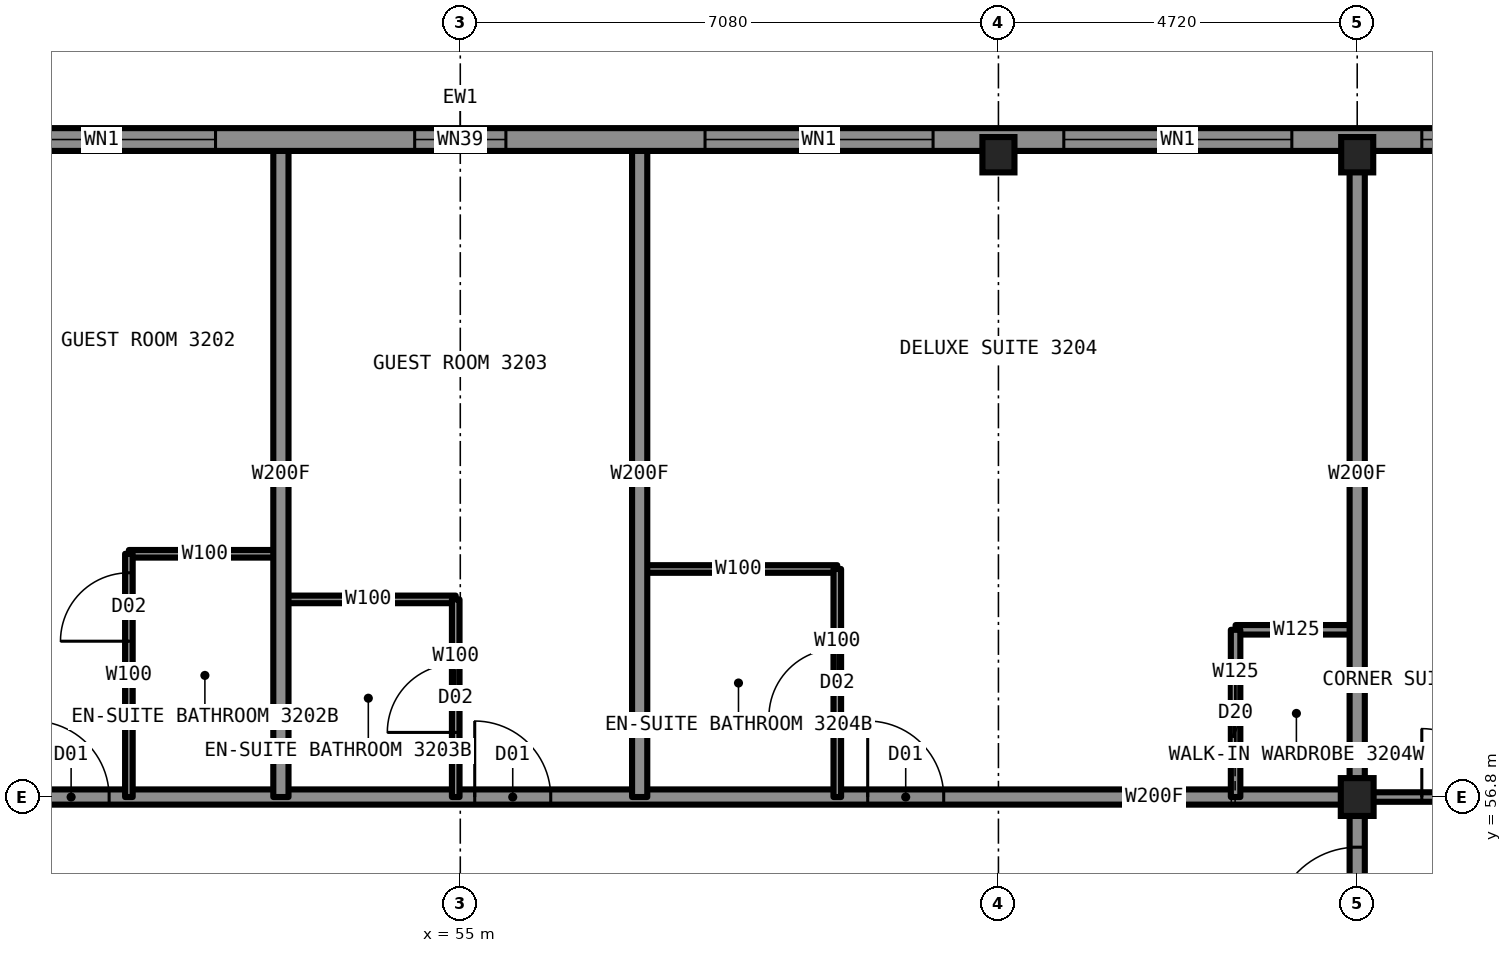
"""IFC4 building model, lengths in metres.
Left out: names, types, materials, properties, quantities, classifications, styles, units other than length and angle.
Written with IfcOpenShell. Run it as: python <this file> out.ifc"""

import sys

from ifc_helpers import new_model, si_unit, direction, frame, frame_2d, origin, origin_2d, place, context, subcontext, project, spatial, rectangle, i_section, extrude, element, fill, save


model = new_model("IFC4")
c1 = context("Model", 3, precision=1e-05, world=origin(), true_north=direction((0.0, 1.0)))
c2 = subcontext(c1, "Body", "Model", "MODEL_VIEW")
j1 = project(units=[si_unit("LENGTHUNIT", "METRE"), si_unit("PLANEANGLEUNIT", "RADIAN")], contexts=[c1])
p1 = place(None, origin())
s1 = spatial("IfcSite", under=j1, at=p1, CompositionType="ELEMENT")
p2 = place(p1, origin())
s2 = spatial("IfcBuilding", under=s1, at=p2, CompositionType="ELEMENT")
p3 = place(p2, frame((0.0, 0.0, 114.4)))
s3 = spatial("IfcBuildingStorey", under=s2, at=p3, CompositionType="ELEMENT", Elevation=114.4)
for number, where, z_axis, x_axis in (
    (1, (62.08, 65.25, 0.0), (0.0, 0.0, 1.0), (1.0, 0.0, 0.0)),
    (2, (66.8, 65.25, 0.0), (0.0, 0.0, 1.0), (1.0, 0.0, 0.0)),
):
    element("IfcColumn", number, at=place(p3, frame(where, z_axis=z_axis, x_axis=x_axis)), inside=s3, PredefinedType="COLUMN", context=c2, shape_type="SweptSolid", body=[
        extrude(i_section(OverallWidth=0.422, OverallDepth=0.465, WebThickness=0.045, FlangeThickness=0.073, at=origin_2d()), origin(), (0.0, 0.0, 1.0), 3.5),
    ])
p4 = place(p3, frame((66.8, 56.8, 0.0), z_axis=(0.0, 0.0, 1.0), x_axis=(1.0, 0.0, 0.0)))
e3 = element("IfcColumn", 3, at=p4, inside=s3, PredefinedType="COLUMN", context=c2, shape_type="SweptSolid", body=[
    extrude(i_section(OverallWidth=0.432, OverallDepth=0.498, WebThickness=0.056, FlangeThickness=0.089, at=origin_2d()), origin(), (0.0, 0.0, 1.0), 3.5),
])
p5 = place(p3, frame((43.2, 56.8, 0.0), z_axis=(0.0, 0.0, 1.0), x_axis=(1.0, 0.0, 0.0)))
e4 = element("IfcWall", 4, at=p5, inside=s3, PredefinedType="PARTITIONING", context=c2, shape_type="SweptSolid", body=[
    extrude(rectangle(XDim=23.6, YDim=0.2, at=frame_2d((11.8, 0.0))), origin(), (0.0, 0.0, 1.0), 3.33),
])
p6 = place(p5, frame((2.26, 0.0, 0.0)))
e5 = element("IfcOpeningElement", 5, at=p6, cuts=e4, PredefinedType="OPENING", context=c2, shape_type="SweptSolid", body=[
    extrude(rectangle(XDim=1.0, YDim=2.2, at=frame_2d((0.5, 1.1))), frame((0.0, 0.11, 0.0), z_axis=(0.0, -1.0, 0.0), x_axis=(1.0, 0.0, 0.0)), (0.0, 0.0, 1.0), 0.22),
])
p7 = place(p5, frame((6.18, 0.0, 0.0)))
e6 = element("IfcOpeningElement", 6, at=p7, cuts=e4, PredefinedType="OPENING", context=c2, shape_type="SweptSolid", body=[
    extrude(rectangle(XDim=1.0, YDim=2.2, at=frame_2d((0.5, 1.1))), frame((0.0, 0.11, 0.0), z_axis=(0.0, -1.0, 0.0), x_axis=(1.0, 0.0, 0.0)), (0.0, 0.0, 1.0), 0.22),
])
p8 = place(p5, frame((11.99, 0.0, 0.0)))
e7 = element("IfcOpeningElement", 7, at=p8, cuts=e4, PredefinedType="OPENING", context=c2, shape_type="SweptSolid", body=[
    extrude(rectangle(XDim=1.0, YDim=2.2, at=frame_2d((0.5, 1.1))), frame((0.0, 0.11, 0.0), z_axis=(0.0, -1.0, 0.0), x_axis=(1.0, 0.0, 0.0)), (0.0, 0.0, 1.0), 0.22),
])
p9 = place(p5, frame((17.16, 0.0, 0.0)))
e8 = element("IfcOpeningElement", 8, at=p9, cuts=e4, PredefinedType="OPENING", context=c2, shape_type="SweptSolid", body=[
    extrude(rectangle(XDim=1.0, YDim=2.2, at=frame_2d((0.5, 1.1))), frame((0.0, 0.11, 0.0), z_axis=(0.0, -1.0, 0.0), x_axis=(1.0, 0.0, 0.0)), (0.0, 0.0, 1.0), 0.22),
])
p10 = place(p3, frame((66.8, 56.8, 0.0), z_axis=(0.0, 0.0, 1.0), x_axis=(1.0, 0.0, 0.0)))
e9 = element("IfcWall", 9, at=p10, inside=s3, PredefinedType="PARTITIONING", context=c2, shape_type="SweptSolid", body=[
    extrude(rectangle(XDim=8.5, YDim=0.125, at=frame_2d((4.25, 0.0))), origin(), (0.0, 0.0, 1.0), 2.573),
])
p11 = place(p10, frame((0.85, 0.0, 0.0)))
e10 = element("IfcOpeningElement", 10, at=p11, cuts=e9, PredefinedType="OPENING", context=c2, shape_type="SweptSolid", body=[
    extrude(rectangle(XDim=0.9, YDim=2.2, at=frame_2d((0.45, 1.1))), frame((0.0, 0.073, 0.0), z_axis=(0.0, -1.0, 0.0), x_axis=(1.0, 0.0, 0.0)), (0.0, 0.0, 1.0), 0.145),
])
p12 = place(p3, frame((65.2, 59.0, 0.0), z_axis=(0.0, 0.0, 1.0), x_axis=(1.0, 0.0, 0.0)))
e11 = element("IfcWall", 11, at=p12, inside=s3, PredefinedType="PARTITIONING", context=c2, shape_type="SweptSolid", body=[
    extrude(rectangle(XDim=1.6, YDim=0.125, at=frame_2d((0.8, 0.0))), origin(), (0.0, 0.0, 1.0), 3.33),
])
p13 = place(p3, frame((52.64, 59.4, 0.0), z_axis=(0.0, 0.0, 1.0), x_axis=(1.0, 0.0, 0.0)))
e12 = element("IfcWall", 12, at=p13, inside=s3, PredefinedType="PARTITIONING", context=c2, shape_type="SweptSolid", body=[
    extrude(rectangle(XDim=2.3, YDim=0.1, at=frame_2d((1.15, 0.0))), origin(), (0.0, 0.0, 1.0), 3.33),
])
p14 = place(p3, frame((57.36, 59.8, 0.0), z_axis=(0.0, 0.0, 1.0), x_axis=(1.0, 0.0, 0.0)))
e13 = element("IfcWall", 13, at=p14, inside=s3, PredefinedType="PARTITIONING", context=c2, shape_type="SweptSolid", body=[
    extrude(rectangle(XDim=2.6, YDim=0.1, at=frame_2d((1.3, 0.0))), origin(), (0.0, 0.0, 1.0), 3.33),
])
p15 = place(p3, frame((50.64, 60.0, 0.0), z_axis=(0.0, 0.0, 1.0), x_axis=(1.0, 0.0, 0.0)))
e14 = element("IfcWall", 14, at=p15, inside=s3, PredefinedType="PARTITIONING", context=c2, shape_type="SweptSolid", body=[
    extrude(rectangle(XDim=2.0, YDim=0.1, at=frame_2d((1.0, 0.0))), origin(), (0.0, 0.0, 1.0), 2.731),
])
p16 = place(p3, frame((54.94, 56.8, 0.0), z_axis=(0.0, 0.0, 1.0), x_axis=(0.0, 1.0, 0.0)))
e15 = element("IfcWall", 15, at=p16, inside=s3, PredefinedType="PARTITIONING", context=c2, shape_type="SweptSolid", body=[
    extrude(rectangle(XDim=2.6, YDim=0.1, at=frame_2d((1.3, 0.0))), origin(), (0.0, 0.0, 1.0), 2.573),
])
p17 = place(p16, frame((0.85, 0.0, 0.0)))
e16 = element("IfcOpeningElement", 16, at=p17, cuts=e15, PredefinedType="OPENING", context=c2, shape_type="SweptSolid", body=[
    extrude(rectangle(XDim=0.9, YDim=2.1, at=frame_2d((0.45, 1.05))), frame((0.0, 0.06, 0.0), z_axis=(0.0, -1.0, 0.0), x_axis=(1.0, 0.0, 0.0)), (0.0, 0.0, 1.0), 0.12),
])
p18 = place(p3, frame((52.64, 56.8, 0.0), z_axis=(0.0, 0.0, 1.0), x_axis=(0.0, 1.0, 0.0)))
e17 = element("IfcWall", 17, at=p18, inside=s3, PredefinedType="PARTITIONING", context=c2, shape_type="SweptSolid", body=[
    extrude(rectangle(XDim=8.5, YDim=0.2, at=frame_2d((4.25, 0.0))), origin(), (0.0, 0.0, 1.0), 3.33),
])
p19 = place(p3, frame((50.64, 56.8, 0.0), z_axis=(0.0, 0.0, 1.0), x_axis=(0.0, 1.0, 0.0)))
e18 = element("IfcWall", 18, at=p19, inside=s3, PredefinedType="PARTITIONING", context=c2, shape_type="SweptSolid", body=[
    extrude(rectangle(XDim=3.2, YDim=0.1, at=frame_2d((1.6, 0.0))), origin(), (0.0, 0.0, 1.0), 3.33),
])
p20 = place(p19, frame((2.05, 0.0, 0.0)))
e19 = element("IfcOpeningElement", 19, at=p20, cuts=e18, PredefinedType="OPENING", context=c2, shape_type="SweptSolid", body=[
    extrude(rectangle(XDim=0.9, YDim=2.1, at=frame_2d((0.45, 1.05))), frame((0.0, 0.06, 0.0), z_axis=(0.0, -1.0, 0.0), x_axis=(1.0, 0.0, 0.0)), (0.0, 0.0, 1.0), 0.12),
])
p21 = place(p3, frame((65.2, 56.8, 0.0), z_axis=(0.0, 0.0, 1.0), x_axis=(0.0, 1.0, 0.0)))
e20 = element("IfcWall", 20, at=p21, inside=s3, PredefinedType="PARTITIONING", context=c2, shape_type="SweptSolid", body=[
    extrude(rectangle(XDim=2.2, YDim=0.125, at=frame_2d((1.1, 0.0))), origin(), (0.0, 0.0, 1.0), 3.33),
])
p22 = place(p21, frame((0.7, 0.0, 0.0)))
e21 = element("IfcOpeningElement", 21, at=p22, cuts=e20, PredefinedType="OPENING", context=c2, shape_type="SweptSolid", body=[
    extrude(rectangle(XDim=0.8, YDim=2.1, at=frame_2d((0.4, 1.05))), frame((0.0, 0.073, 0.0), z_axis=(0.0, -1.0, 0.0), x_axis=(1.0, 0.0, 0.0)), (0.0, 0.0, 1.0), 0.145),
])
p23 = place(p3, frame((66.8, 52.08, 0.0), z_axis=(0.0, 0.0, 1.0), x_axis=(0.0, 1.0, 0.0)))
e22 = element("IfcWall", 22, at=p23, inside=s3, PredefinedType="PARTITIONING", context=c2, shape_type="SweptSolid", body=[
    extrude(rectangle(XDim=4.72, YDim=0.2, at=frame_2d((2.36, 0.0))), origin(), (0.0, 0.0, 1.0), 3.33),
])
p24 = place(p23, frame((2.96, 0.0, 0.0)))
e23 = element("IfcOpeningElement", 23, at=p24, cuts=e22, PredefinedType="OPENING", context=c2, shape_type="SweptSolid", body=[
    extrude(rectangle(XDim=1.1, YDim=2.2, at=frame_2d((0.55, 1.1))), frame((0.0, 0.11, 0.0), z_axis=(0.0, -1.0, 0.0), x_axis=(1.0, 0.0, 0.0)), (0.0, 0.0, 1.0), 0.22),
])
p25 = place(p3, frame((66.8, 56.8, 0.0), z_axis=(0.0, 0.0, 1.0), x_axis=(0.0, 1.0, 0.0)))
e24 = element("IfcWall", 24, at=p25, inside=s3, PredefinedType="PARTITIONING", context=c2, shape_type="SweptSolid", body=[
    extrude(rectangle(XDim=8.5, YDim=0.2, at=frame_2d((4.25, 0.0))), origin(), (0.0, 0.0, 1.0), 2.573),
])
p26 = place(p3, frame((57.36, 56.8, 0.0), z_axis=(0.0, 0.0, 1.0), x_axis=(0.0, 1.0, 0.0)))
e25 = element("IfcWall", 25, at=p26, inside=s3, PredefinedType="PARTITIONING", context=c2, shape_type="SweptSolid", body=[
    extrude(rectangle(XDim=8.5, YDim=0.2, at=frame_2d((4.25, 0.0))), origin(), (0.0, 0.0, 1.0), 3.33),
])
p27 = place(p3, frame((59.96, 56.8, 0.0), z_axis=(0.0, 0.0, 1.0), x_axis=(0.0, 1.0, 0.0)))
e26 = element("IfcWall", 26, at=p27, inside=s3, PredefinedType="PARTITIONING", context=c2, shape_type="SweptSolid", body=[
    extrude(rectangle(XDim=3.0, YDim=0.1, at=frame_2d((1.5, 0.0))), origin(), (0.0, 0.0, 1.0), 3.33),
])
p28 = place(p27, frame((1.05, 0.0, 0.0)))
e27 = element("IfcOpeningElement", 27, at=p28, cuts=e26, PredefinedType="OPENING", context=c2, shape_type="SweptSolid", body=[
    extrude(rectangle(XDim=0.9, YDim=2.1, at=frame_2d((0.45, 1.05))), frame((0.0, 0.06, 0.0), z_axis=(0.0, -1.0, 0.0), x_axis=(1.0, 0.0, 0.0)), (0.0, 0.0, 1.0), 0.12),
])
p29 = place(p3, frame((70.1, 65.45, 0.0), z_axis=(0.0, 0.0, 1.0), x_axis=(-1.0, 0.0, 0.0)))
e28 = element("IfcWall", 28, at=p29, inside=s3, PredefinedType="SOLIDWALL", context=c2, shape_type="SweptSolid", body=[
    extrude(rectangle(XDim=30.2, YDim=0.3, at=frame_2d((15.1, 0.0))), origin(), (0.0, 0.0, 1.0), 2.83),
])
p30 = place(p29, frame((0.85, 0.0, 0.5)))
e29 = element("IfcOpeningElement", 29, at=p30, cuts=e28, PredefinedType="OPENING", context=c2, shape_type="SweptSolid", body=[
    extrude(rectangle(XDim=1.6, YDim=2.0, at=frame_2d((0.8, 1.0))), frame((0.0, 0.16, 0.0), z_axis=(0.0, -1.0, 0.0), x_axis=(1.0, 0.0, 0.0)), (0.0, 0.0, 1.0), 0.32),
])
p31 = place(p29, frame((4.16, 0.0, 0.5)))
e30 = element("IfcOpeningElement", 30, at=p31, cuts=e28, PredefinedType="OPENING", context=c2, shape_type="SweptSolid", body=[
    extrude(rectangle(XDim=3.0, YDim=2.0, at=frame_2d((1.5, 1.0))), frame((0.0, 0.16, 0.0), z_axis=(0.0, -1.0, 0.0), x_axis=(1.0, 0.0, 0.0)), (0.0, 0.0, 1.0), 0.32),
])
p32 = place(p29, frame((10.53, 0.0, 0.5)))
e31 = element("IfcOpeningElement", 31, at=p32, cuts=e28, PredefinedType="OPENING", context=c2, shape_type="SweptSolid", body=[
    extrude(rectangle(XDim=1.3, YDim=1.9, at=frame_2d((0.65, 0.95))), frame((0.0, 0.16, 0.0), z_axis=(0.0, -1.0, 0.0), x_axis=(1.0, 0.0, 0.0)), (0.0, 0.0, 1.0), 0.32),
])
p33 = place(p29, frame((13.6, 0.0, 0.5)))
e32 = element("IfcOpeningElement", 32, at=p33, cuts=e28, PredefinedType="OPENING", context=c2, shape_type="SweptSolid", body=[
    extrude(rectangle(XDim=3.0, YDim=2.0, at=frame_2d((1.5, 1.0))), frame((0.0, 0.16, 0.0), z_axis=(0.0, -1.0, 0.0), x_axis=(1.0, 0.0, 0.0)), (0.0, 0.0, 1.0), 0.32),
])
p34 = place(p29, frame((18.32, 0.0, 0.5)))
e33 = element("IfcOpeningElement", 33, at=p34, cuts=e28, PredefinedType="OPENING", context=c2, shape_type="SweptSolid", body=[
    extrude(rectangle(XDim=1.3, YDim=1.9, at=frame_2d((0.65, 0.95))), frame((0.0, 0.16, 0.0), z_axis=(0.0, -1.0, 0.0), x_axis=(1.0, 0.0, 0.0)), (0.0, 0.0, 1.0), 0.32),
])
p35 = place(p29, frame((23.04, 0.0, 0.5)))
e34 = element("IfcOpeningElement", 34, at=p35, cuts=e28, PredefinedType="OPENING", context=c2, shape_type="SweptSolid", body=[
    extrude(rectangle(XDim=3.0, YDim=2.0, at=frame_2d((1.5, 1.0))), frame((0.0, 0.16, 0.0), z_axis=(0.0, -1.0, 0.0), x_axis=(1.0, 0.0, 0.0)), (0.0, 0.0, 1.0), 0.32),
])
p36 = place(p29, frame((27.75, 0.0, 0.5)))
e35 = element("IfcOpeningElement", 35, at=p36, cuts=e28, PredefinedType="OPENING", context=c2, shape_type="SweptSolid", body=[
    extrude(rectangle(XDim=1.6, YDim=2.0, at=frame_2d((0.8, 1.0))), frame((0.0, 0.16, 0.0), z_axis=(0.0, -1.0, 0.0), x_axis=(1.0, 0.0, 0.0)), (0.0, 0.0, 1.0), 0.32),
])
p37 = place(p29, frame((9.88, 0.0, 0.5)))
e36 = element("IfcOpeningElement", 36, at=p37, cuts=e28, PredefinedType="OPENING", context=c2, shape_type="SweptSolid", body=[
    extrude(rectangle(XDim=0.6, YDim=0.9, at=frame_2d((0.3, 0.45))), frame((0.0, 0.16, 0.0), z_axis=(0.0, -1.0, 0.0), x_axis=(1.0, 0.0, 0.0)), (0.0, 0.0, 1.0), 0.32),
])
p38 = place(p29, frame((19.67, 0.0, 0.5)))
e37 = element("IfcOpeningElement", 37, at=p38, cuts=e28, PredefinedType="OPENING", context=c2, shape_type="SweptSolid", body=[
    extrude(rectangle(XDim=0.6, YDim=0.9, at=frame_2d((0.3, 0.45))), frame((0.0, 0.16, 0.0), z_axis=(0.0, -1.0, 0.0), x_axis=(1.0, 0.0, 0.0)), (0.0, 0.0, 1.0), 0.32),
])
p39 = place(p7, origin())
e38 = element("IfcDoor", 38, at=p39, inside=s3, OperationType="SINGLE_SWING_LEFT", PredefinedType="DOOR", context=c2, shape_type="SweptSolid", body=[
    extrude(rectangle(XDim=1.0, YDim=2.2, at=frame_2d((0.5, 1.1))), frame((0.0, 0.025, 0.0), z_axis=(0.0, -1.0, 0.0), x_axis=(1.0, 0.0, 0.0)), (0.0, 0.0, 1.0), 0.05),
])
fill(e6, e38)
p40 = place(p20, origin())
e39 = element("IfcDoor", 39, at=p40, inside=s3, OperationType="SINGLE_SWING_RIGHT", PredefinedType="DOOR", context=c2, shape_type="SweptSolid", body=[
    extrude(rectangle(XDim=0.9, YDim=2.1, at=frame_2d((0.45, 1.05))), frame((0.0, 0.025, 0.0), z_axis=(0.0, -1.0, 0.0), x_axis=(1.0, 0.0, 0.0)), (0.0, 0.0, 1.0), 0.05),
])
fill(e19, e39)
p41 = place(p8, origin())
e40 = element("IfcDoor", 40, at=p41, inside=s3, OperationType="SINGLE_SWING_LEFT", PredefinedType="DOOR", context=c2, shape_type="SweptSolid", body=[
    extrude(rectangle(XDim=1.0, YDim=2.2, at=frame_2d((0.5, 1.1))), frame((0.0, 0.025, 0.0), z_axis=(0.0, -1.0, 0.0), x_axis=(1.0, 0.0, 0.0)), (0.0, 0.0, 1.0), 0.05),
])
fill(e7, e40)
p42 = place(p17, origin())
e41 = element("IfcDoor", 41, at=p42, inside=s3, OperationType="SINGLE_SWING_RIGHT", PredefinedType="DOOR", context=c2, shape_type="SweptSolid", body=[
    extrude(rectangle(XDim=0.9, YDim=2.1, at=frame_2d((0.45, 1.05))), frame((0.0, 0.025, 0.0), z_axis=(0.0, -1.0, 0.0), x_axis=(1.0, 0.0, 0.0)), (0.0, 0.0, 1.0), 0.05),
])
fill(e16, e41)
p43 = place(p9, origin())
e42 = element("IfcDoor", 42, at=p43, inside=s3, OperationType="SINGLE_SWING_LEFT", PredefinedType="DOOR", context=c2, shape_type="SweptSolid", body=[
    extrude(rectangle(XDim=1.0, YDim=2.2, at=frame_2d((0.5, 1.1))), frame((0.0, 0.025, 0.0), z_axis=(0.0, -1.0, 0.0), x_axis=(1.0, 0.0, 0.0)), (0.0, 0.0, 1.0), 0.05),
])
fill(e8, e42)
p44 = place(p28, origin())
e43 = element("IfcDoor", 43, at=p44, inside=s3, OperationType="SINGLE_SWING_RIGHT", PredefinedType="DOOR", context=c2, shape_type="SweptSolid", body=[
    extrude(rectangle(XDim=0.9, YDim=2.1, at=frame_2d((0.45, 1.05))), frame((0.0, 0.025, 0.0), z_axis=(0.0, -1.0, 0.0), x_axis=(1.0, 0.0, 0.0)), (0.0, 0.0, 1.0), 0.05),
])
fill(e27, e43)
p45 = place(p22, origin())
e44 = element("IfcDoor", 44, at=p45, inside=s3, OperationType="SLIDING_TO_LEFT", PredefinedType="DOOR", context=c2, shape_type="SweptSolid", body=[
    extrude(rectangle(XDim=0.8, YDim=2.1, at=frame_2d((0.4, 1.05))), frame((0.0, 0.025, 0.0), z_axis=(0.0, -1.0, 0.0), x_axis=(1.0, 0.0, 0.0)), (0.0, 0.0, 1.0), 0.05),
])
fill(e21, e44)
p46 = place(p11, origin())
e45 = element("IfcDoor", 45, at=p46, inside=s3, OperationType="SINGLE_SWING_LEFT", PredefinedType="DOOR", context=c2, shape_type="SweptSolid", body=[
    extrude(rectangle(XDim=0.9, YDim=2.2, at=frame_2d((0.45, 1.1))), frame((0.0, 0.025, 0.0), z_axis=(0.0, -1.0, 0.0), x_axis=(1.0, 0.0, 0.0)), (0.0, 0.0, 1.0), 0.05),
])
fill(e10, e45)
p47 = place(p24, origin())
e46 = element("IfcDoor", 46, at=p47, inside=s3, OperationType="SINGLE_SWING_LEFT", PredefinedType="DOOR", context=c2, shape_type="SweptSolid", body=[
    extrude(rectangle(XDim=1.1, YDim=2.2, at=frame_2d((0.55, 1.1))), frame((0.0, 0.025, 0.0), z_axis=(0.0, -1.0, 0.0), x_axis=(1.0, 0.0, 0.0)), (0.0, 0.0, 1.0), 0.05),
])
fill(e23, e46)
p48 = place(p30, origin())
e47 = element("IfcWindow", 47, at=p48, inside=s3, PartitioningType="SINGLE_PANEL", PredefinedType="WINDOW", context=c2, shape_type="SweptSolid", body=[
    extrude(rectangle(XDim=1.6, YDim=2.0, at=frame_2d((0.8, 1.0))), frame((0.0, 0.03, 0.0), z_axis=(0.0, -1.0, 0.0), x_axis=(1.0, 0.0, 0.0)), (0.0, 0.0, 1.0), 0.06),
])
fill(e29, e47)
p49 = place(p31, origin())
e48 = element("IfcWindow", 48, at=p49, inside=s3, PartitioningType="SINGLE_PANEL", PredefinedType="WINDOW", context=c2, shape_type="SweptSolid", body=[
    extrude(rectangle(XDim=3.0, YDim=2.0, at=frame_2d((1.5, 1.0))), frame((0.0, 0.03, 0.0), z_axis=(0.0, -1.0, 0.0), x_axis=(1.0, 0.0, 0.0)), (0.0, 0.0, 1.0), 0.06),
])
fill(e30, e48)
p50 = place(p32, origin())
e49 = element("IfcWindow", 49, at=p50, inside=s3, PartitioningType="SINGLE_PANEL", PredefinedType="WINDOW", context=c2, shape_type="SweptSolid", body=[
    extrude(rectangle(XDim=1.3, YDim=1.9, at=frame_2d((0.65, 0.95))), frame((0.0, 0.03, 0.0), z_axis=(0.0, -1.0, 0.0), x_axis=(1.0, 0.0, 0.0)), (0.0, 0.0, 1.0), 0.06),
])
fill(e31, e49)
p51 = place(p33, origin())
e50 = element("IfcWindow", 50, at=p51, inside=s3, PartitioningType="SINGLE_PANEL", PredefinedType="WINDOW", context=c2, shape_type="SweptSolid", body=[
    extrude(rectangle(XDim=3.0, YDim=2.0, at=frame_2d((1.5, 1.0))), frame((0.0, 0.03, 0.0), z_axis=(0.0, -1.0, 0.0), x_axis=(1.0, 0.0, 0.0)), (0.0, 0.0, 1.0), 0.06),
])
fill(e32, e50)
p52 = place(p34, origin())
e51 = element("IfcWindow", 51, at=p52, inside=s3, PartitioningType="SINGLE_PANEL", PredefinedType="WINDOW", context=c2, shape_type="SweptSolid", body=[
    extrude(rectangle(XDim=1.3, YDim=1.9, at=frame_2d((0.65, 0.95))), frame((0.0, 0.03, 0.0), z_axis=(0.0, -1.0, 0.0), x_axis=(1.0, 0.0, 0.0)), (0.0, 0.0, 1.0), 0.06),
])
fill(e33, e51)
p53 = place(p37, origin())
e52 = element("IfcWindow", 52, at=p53, inside=s3, PartitioningType="SINGLE_PANEL", PredefinedType="WINDOW", context=c2, shape_type="SweptSolid", body=[
    extrude(rectangle(XDim=0.6, YDim=0.9, at=frame_2d((0.3, 0.45))), frame((0.0, 0.03, 0.0), z_axis=(0.0, -1.0, 0.0), x_axis=(1.0, 0.0, 0.0)), (0.0, 0.0, 1.0), 0.06),
])
fill(e36, e52)
p54 = place(p38, origin())
e53 = element("IfcWindow", 53, at=p54, inside=s3, PartitioningType="SINGLE_PANEL", PredefinedType="WINDOW", context=c2, shape_type="SweptSolid", body=[
    extrude(rectangle(XDim=0.6, YDim=0.9, at=frame_2d((0.3, 0.45))), frame((0.0, 0.03, 0.0), z_axis=(0.0, -1.0, 0.0), x_axis=(1.0, 0.0, 0.0)), (0.0, 0.0, 1.0), 0.06),
])
fill(e37, e53)
save(model, sys.argv[1])
